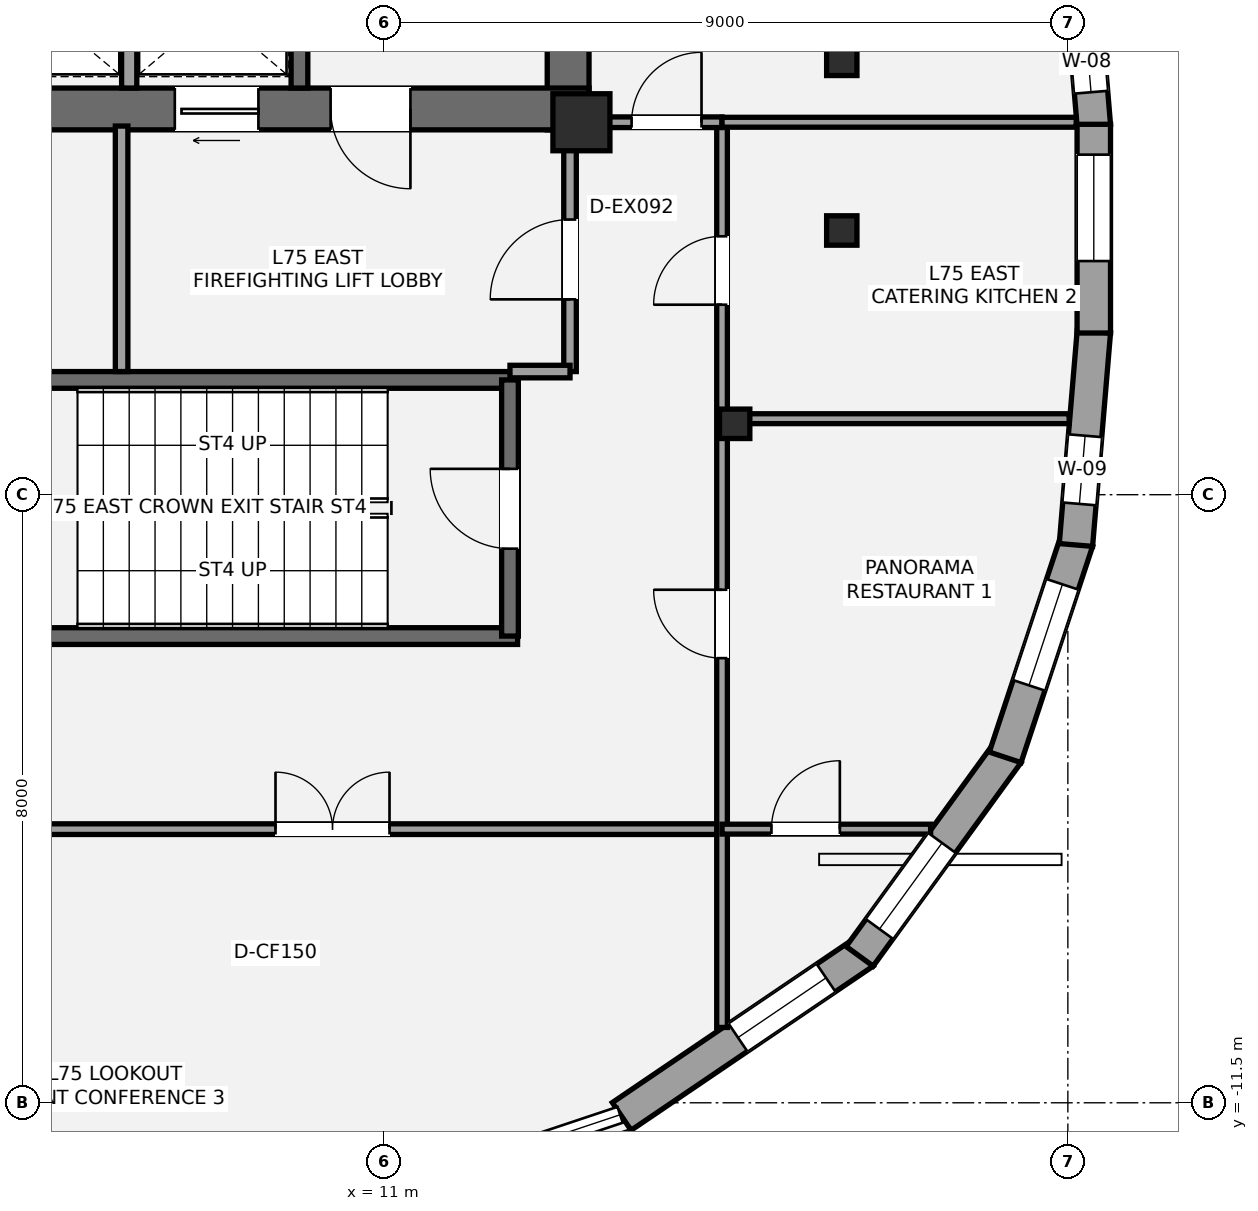
"""IFC4 building model, lengths in metres.
Left out: names, types, materials, properties, quantities, classifications, styles, units other than length and angle.
Written with IfcOpenShell. Run it as: python <this file> out.ifc"""

import sys

from ifc_helpers import new_model, si_unit, direction, frame, frame_2d, origin, origin_2d, place, context, subcontext, project, spatial, rectangle, i_section, extrude, element, fill, save


model = new_model("IFC4")
c1 = context("Model", 3, precision=1e-05, world=origin(), true_north=direction((0.0, 1.0)))
c2 = subcontext(c1, "Body", "Model", "MODEL_VIEW")
j1 = project(units=[si_unit("LENGTHUNIT", "METRE"), si_unit("PLANEANGLEUNIT", "RADIAN")], contexts=[c1])
p1 = place(None, origin())
s1 = spatial("IfcSite", under=j1, at=p1, CompositionType="ELEMENT")
p2 = place(p1, origin())
s2 = spatial("IfcBuilding", under=s1, at=p2, CompositionType="ELEMENT")
p3 = place(p2, frame((0.0, 0.0, 264.8)))
s3 = spatial("IfcBuildingStorey", under=s2, at=p3, CompositionType="ELEMENT", Elevation=264.8)
p4 = place(p3, frame((13.425, 1.3, 0.0), z_axis=(0.0, 0.0, 1.0), x_axis=(0.0, 1.0, 0.0)))
e1 = element("IfcWall", 1, at=p4, inside=s3, PredefinedType="SHEAR", context=c2, shape_type="SweptSolid", body=[
    extrude(rectangle(XDim=8.25, YDim=0.55, at=frame_2d((4.125, 0.0))), origin(), (0.0, 0.0, 1.0), 4.4),
])
p5 = place(p3, frame((13.7, 1.575, 0.0), z_axis=(0.0, 0.0, 1.0), x_axis=(-1.0, 0.0, 0.0)))
e2 = element("IfcWall", 2, at=p5, inside=s3, PredefinedType="SHEAR", context=c2, shape_type="SweptSolid", body=[
    extrude(rectangle(XDim=8.775, YDim=0.55, at=frame_2d((4.387, 0.0))), origin(), (0.0, 0.0, 1.0), 4.4),
])
p6 = place(p5, frame((2.35, 0.0, 0.0)))
e3 = element("IfcOpeningElement", 3, at=p6, cuts=e2, PredefinedType="OPENING", context=c2, shape_type="SweptSolid", body=[
    extrude(rectangle(XDim=1.05, YDim=2.15, at=frame_2d((0.525, 1.075))), frame((0.0, 0.285, 0.0), z_axis=(0.0, -1.0, 0.0), x_axis=(1.0, 0.0, 0.0)), (0.0, 0.0, 1.0), 0.57),
])
p7 = place(p5, frame((4.35, 0.0, 0.0)))
e4 = element("IfcOpeningElement", 4, at=p7, cuts=e2, PredefinedType="OPENING", context=c2, shape_type="SweptSolid", body=[
    extrude(rectangle(XDim=1.1, YDim=2.2, at=frame_2d((0.55, 1.1))), frame((0.0, 0.285, 0.0), z_axis=(0.0, -1.0, 0.0), x_axis=(1.0, 0.0, 0.0)), (0.0, 0.0, 1.0), 0.57),
])
p8 = place(p3, frame((9.89, 1.85, 0.0), z_axis=(0.0, 0.0, 1.0), x_axis=(0.0, 1.0, 0.0)))
e5 = element("IfcWall", 5, at=p8, inside=s3, PredefinedType="SHEAR", context=c2, shape_type="SweptSolid", body=[
    extrude(rectangle(XDim=7.15, YDim=0.22, at=frame_2d((3.575, 0.0))), origin(), (0.0, 0.0, 1.0), 4.4),
])
for number, where, z_axis, x_axis in (
    (6, (5.26, -1.99, 0.0), (0.0, 0.0, 1.0), (1.0, 0.0, 0.0)),
    (7, (5.26, -5.36, 0.0), (0.0, 0.0, 1.0), (1.0, 0.0, 0.0)),
):
    element("IfcWall", number, at=place(p3, frame(where, z_axis=z_axis, x_axis=x_axis)), inside=s3, PredefinedType="SHEAR", context=c2, shape_type="SweptSolid", body=[
        extrude(rectangle(XDim=7.5, YDim=0.22, at=frame_2d((3.75, 0.0))), origin(), (0.0, 0.0, 1.0), 4.4),
    ])
p9 = place(p3, frame((12.66, -5.36, 0.0), z_axis=(0.0, 0.0, 1.0), x_axis=(0.0, 1.0, 0.0)))
e8 = element("IfcWall", 8, at=p9, inside=s3, PredefinedType="SHEAR", context=c2, shape_type="SweptSolid", body=[
    extrude(rectangle(XDim=3.37, YDim=0.22, at=frame_2d((1.685, 0.0))), origin(), (0.0, 0.0, 1.0), 4.4),
])
p10 = place(p9, frame((1.15, 0.0, 0.0)))
e9 = element("IfcOpeningElement", 9, at=p10, cuts=e8, PredefinedType="OPENING", context=c2, shape_type="SweptSolid", body=[
    extrude(rectangle(XDim=1.05, YDim=2.15, at=frame_2d((0.525, 1.075))), frame((0.0, 0.12, 0.0), z_axis=(0.0, -1.0, 0.0), x_axis=(1.0, 0.0, 0.0)), (0.0, 0.0, 1.0), 0.24),
])
p11 = place(p3, frame((13.6, 1.4, 0.0), z_axis=(0.0, 0.0, 1.0), x_axis=(1.0, 0.0, 0.0)))
e10 = element("IfcColumn", 10, at=p11, inside=s3, PredefinedType="PILASTER", context=c2, shape_type="SweptSolid", body=[
    extrude(rectangle(XDim=0.75, YDim=0.75, at=origin_2d()), origin(), (0.0, 0.0, 1.0), 4.4),
])
for number, where, z_axis, x_axis in (
    (11, (17.026, 2.208, 0.0), (0.0, 0.0, 1.0), (1.0, 0.0, 0.0)),
    (12, (15.616, -2.567, 0.0), (0.0, 0.0, 1.0), (1.0, 0.0, 0.0)),
    (13, (17.026, -0.024, 0.0), (0.0, 0.0, 1.0), (1.0, 0.0, 0.0)),
):
    element("IfcColumn", number, at=place(p3, frame(where, z_axis=z_axis, x_axis=x_axis)), inside=s3, PredefinedType="COLUMN", context=c2, shape_type="SweptSolid", body=[
        extrude(i_section(OverallWidth=0.399, OverallDepth=0.387, WebThickness=0.021, FlangeThickness=0.033, at=origin_2d()), origin(), (0.0, 0.0, 1.0), 4.4),
    ])
p12 = place(p3, frame((20.106, 4.162, 0.0), z_axis=(0.0, 0.0, 1.0), x_axis=(0.083719665048, -0.996489346498, 0.0)))
e14 = element("IfcWall", 14, at=p12, inside=s3, PredefinedType="STANDARD", context=c2, shape_type="SweptSolid", body=[
    extrude(rectangle(XDim=2.817, YDim=0.44, at=frame_2d((1.409, 0.0))), origin(), (0.0, 0.0, 1.0), 3.566),
])
p13 = place(p12, frame((0.975, 0.0, 0.6)))
e15 = element("IfcOpeningElement", 15, at=p13, cuts=e14, PredefinedType="OPENING", context=c2, shape_type="SweptSolid", body=[
    extrude(rectangle(XDim=1.4, YDim=1.55, at=frame_2d((0.7, 0.775))), frame((0.0, 0.23, 0.0), z_axis=(0.0, -1.0, 0.0), x_axis=(1.0, 0.0, 0.0)), (0.0, 0.0, 1.0), 0.46),
])
p14 = place(p3, frame((17.315, -9.52, 0.0), z_axis=(0.0, 0.0, 1.0), x_axis=(-0.827730474906, -0.561125886867, 0.0)))
e16 = element("IfcWall", 16, at=p14, inside=s3, PredefinedType="STANDARD", context=c2, shape_type="SweptSolid", body=[
    extrude(rectangle(XDim=3.848, YDim=0.44, at=frame_2d((1.924, 0.0))), origin(), (0.0, 0.0, 1.0), 3.566),
])
p15 = place(p14, frame((0.6, 0.0, 0.58)))
e17 = element("IfcOpeningElement", 17, at=p15, cuts=e16, PredefinedType="OPENING", context=c2, shape_type="SweptSolid", body=[
    extrude(rectangle(XDim=1.4, YDim=1.55, at=frame_2d((0.7, 0.775))), frame((0.0, 0.23, 0.0), z_axis=(0.0, -1.0, 0.0), x_axis=(1.0, 0.0, 0.0)), (0.0, 0.0, 1.0), 0.46),
])
p16 = place(p3, frame((19.207, -6.895, 0.0), z_axis=(0.0, 0.0, 1.0), x_axis=(-0.5878953838, -0.808936967697, 0.0)))
e18 = element("IfcWall", 18, at=p16, inside=s3, PredefinedType="STANDARD", context=c2, shape_type="SweptSolid", body=[
    extrude(rectangle(XDim=3.31, YDim=0.44, at=frame_2d((1.655, 0.0))), origin(), (0.0, 0.0, 1.0), 3.566),
])
p17 = place(p16, frame((1.467, 0.0, 0.58)))
e19 = element("IfcOpeningElement", 19, at=p17, cuts=e18, PredefinedType="OPENING", context=c2, shape_type="SweptSolid", body=[
    extrude(rectangle(XDim=1.4, YDim=1.55, at=frame_2d((0.7, 0.775))), frame((0.0, 0.23, 0.0), z_axis=(0.0, -1.0, 0.0), x_axis=(1.0, 0.0, 0.0)), (0.0, 0.0, 1.0), 0.46),
])
p18 = place(p3, frame((20.117, -4.111, 0.0), z_axis=(0.0, 0.0, 1.0), x_axis=(-0.314148979119, -0.949373698245, 0.0)))
e20 = element("IfcWall", 20, at=p18, inside=s3, PredefinedType="STANDARD", context=c2, shape_type="SweptSolid", body=[
    extrude(rectangle(XDim=2.996, YDim=0.44, at=frame_2d((1.498, 0.0))), origin(), (0.0, 0.0, 1.0), 3.566),
])
p19 = place(p18, frame((0.599, 0.0, 0.58)))
e21 = element("IfcOpeningElement", 21, at=p19, cuts=e20, PredefinedType="OPENING", context=c2, shape_type="SweptSolid", body=[
    extrude(rectangle(XDim=1.4, YDim=1.55, at=frame_2d((0.7, 0.775))), frame((0.0, 0.23, 0.0), z_axis=(0.0, -1.0, 0.0), x_axis=(1.0, 0.0, 0.0)), (0.0, 0.0, 1.0), 0.46),
])
p20 = place(p3, frame((20.342, -1.354, 0.0), z_axis=(0.0, 0.0, 1.0), x_axis=(-0.083719665048, -0.996489346498, 0.0)))
e22 = element("IfcWall", 22, at=p20, inside=s3, PredefinedType="STANDARD", context=c2, shape_type="SweptSolid", body=[
    extrude(rectangle(XDim=2.817, YDim=0.44, at=frame_2d((1.409, 0.0))), origin(), (0.0, 0.0, 1.0), 3.566),
])
p21 = place(p20, frame((1.375, 0.0, 0.58)))
e23 = element("IfcOpeningElement", 23, at=p21, cuts=e22, PredefinedType="OPENING", context=c2, shape_type="SweptSolid", body=[
    extrude(rectangle(XDim=0.9, YDim=1.35, at=frame_2d((0.45, 0.675))), frame((0.0, 0.23, 0.0), z_axis=(0.0, -1.0, 0.0), x_axis=(1.0, 0.0, 0.0)), (0.0, 0.0, 1.0), 0.46),
])
p22 = place(p3, frame((20.341, 1.373, 0.0), z_axis=(0.0, 0.0, 1.0), x_axis=(0.0, -1.0, 0.0)))
e24 = element("IfcWall", 24, at=p22, inside=s3, PredefinedType="STANDARD", context=c2, shape_type="SweptSolid", body=[
    extrude(rectangle(XDim=2.746, YDim=0.44, at=frame_2d((1.373, 0.0))), origin(), (0.0, 0.0, 1.0), 3.566),
])
p23 = place(p22, frame((0.399, 0.0, 0.58)))
e25 = element("IfcOpeningElement", 25, at=p23, cuts=e24, PredefinedType="OPENING", context=c2, shape_type="SweptSolid", body=[
    extrude(rectangle(XDim=1.4, YDim=1.55, at=frame_2d((0.7, 0.775))), frame((0.0, 0.23, 0.0), z_axis=(0.0, -1.0, 0.0), x_axis=(1.0, 0.0, 0.0)), (0.0, 0.0, 1.0), 0.46),
])
p24 = place(p3, frame((7.55, -1.88, 0.0), z_axis=(0.0, 0.0, 1.0), x_axis=(0.0, 1.0, 0.0)))
e26 = element("IfcWall", 26, at=p24, inside=s3, PredefinedType="PARTITIONING", context=c2, shape_type="SweptSolid", body=[
    extrude(rectangle(XDim=3.23, YDim=0.165, at=frame_2d((1.615, 0.0))), origin(), (0.0, 0.0, 1.0), 4.2),
])
p25 = place(p3, frame((13.45, -1.88, 0.0), z_axis=(0.0, 0.0, 1.0), x_axis=(0.0, 1.0, 0.0)))
e27 = element("IfcWall", 27, at=p25, inside=s3, PredefinedType="PARTITIONING", context=c2, shape_type="SweptSolid", body=[
    extrude(rectangle(XDim=3.23, YDim=0.165, at=frame_2d((1.615, 0.0))), origin(), (0.0, 0.0, 1.0), 3.661),
])
p26 = place(p25, frame((0.95, 0.0, 0.0)))
e28 = element("IfcOpeningElement", 28, at=p26, cuts=e27, PredefinedType="OPENING", context=c2, shape_type="SweptSolid", body=[
    extrude(rectangle(XDim=1.05, YDim=2.15, at=frame_2d((0.525, 1.075))), frame((0.0, 0.093, 0.0), z_axis=(0.0, -1.0, 0.0), x_axis=(1.0, 0.0, 0.0)), (0.0, 0.0, 1.0), 0.185),
])
p27 = place(p3, frame((12.66, -1.88, 0.0), z_axis=(0.0, 0.0, 1.0), x_axis=(1.0, 0.0, 0.0)))
e29 = element("IfcWall", 29, at=p27, inside=s3, PredefinedType="PARTITIONING", context=c2, shape_type="SweptSolid", body=[
    extrude(rectangle(XDim=0.79, YDim=0.165, at=frame_2d((0.395, 0.0))), origin(), (0.0, 0.0, 1.0), 3.661),
])
p28 = place(p3, frame((7.65, 1.85, 0.0), z_axis=(0.0, 0.0, 1.0), x_axis=(0.0, 1.0, 0.0)))
e30 = element("IfcWall", 30, at=p28, inside=s3, PredefinedType="SOLIDWALL", context=c2, shape_type="SweptSolid", body=[
    extrude(rectangle(XDim=1.97, YDim=0.2, at=frame_2d((0.985, 0.0))), origin(), (0.0, 0.0, 1.0), 4.2),
])
p29 = place(p3, frame((-15.45, -7.9, 0.0), z_axis=(0.0, 0.0, 1.0), x_axis=(1.0, 0.0, 0.0)))
e31 = element("IfcWall", 31, at=p29, inside=s3, PredefinedType="PARTITIONING", context=c2, shape_type="SweptSolid", body=[
    extrude(rectangle(XDim=30.9, YDim=0.14, at=frame_2d((15.45, 0.0))), origin(), (0.0, 0.0, 1.0), 3.661),
])
p30 = place(p29, frame((5.275, 0.0, 0.0)))
e32 = element("IfcOpeningElement", 32, at=p30, cuts=e31, PredefinedType="OPENING", context=c2, shape_type="SweptSolid", body=[
    extrude(rectangle(XDim=0.9, YDim=2.1, at=frame_2d((0.45, 1.05))), frame((0.0, 0.08, 0.0), z_axis=(0.0, -1.0, 0.0), x_axis=(1.0, 0.0, 0.0)), (0.0, 0.0, 1.0), 0.16),
])
p31 = place(p29, frame((15.6, 0.0, 0.0)))
e33 = element("IfcOpeningElement", 33, at=p31, cuts=e31, PredefinedType="OPENING", context=c2, shape_type="SweptSolid", body=[
    extrude(rectangle(XDim=0.9, YDim=2.1, at=frame_2d((0.45, 1.05))), frame((0.0, 0.08, 0.0), z_axis=(0.0, -1.0, 0.0), x_axis=(1.0, 0.0, 0.0)), (0.0, 0.0, 1.0), 0.16),
])
p32 = place(p29, frame((25.025, 0.0, 0.0)))
e34 = element("IfcOpeningElement", 34, at=p32, cuts=e31, PredefinedType="OPENING", context=c2, shape_type="SweptSolid", body=[
    extrude(rectangle(XDim=1.5, YDim=2.15, at=frame_2d((0.75, 1.075))), frame((0.0, 0.08, 0.0), z_axis=(0.0, -1.0, 0.0), x_axis=(1.0, 0.0, 0.0)), (0.0, 0.0, 1.0), 0.16),
])
p33 = place(p3, frame((15.45, -10.509, 0.0), z_axis=(0.0, 0.0, 1.0), x_axis=(0.0, 1.0, 0.0)))
e35 = element("IfcWall", 35, at=p33, inside=s3, PredefinedType="PARTITIONING", context=c2, shape_type="SweptSolid", body=[
    extrude(rectangle(XDim=11.909, YDim=0.14, at=frame_2d((5.955, 0.0))), origin(), (0.0, 0.0, 1.0), 3.661),
])
p34 = place(p33, frame((4.859, 0.0, 0.0)))
e36 = element("IfcOpeningElement", 36, at=p34, cuts=e35, PredefinedType="OPENING", context=c2, shape_type="SweptSolid", body=[
    extrude(rectangle(XDim=0.9, YDim=2.1, at=frame_2d((0.45, 1.05))), frame((0.0, 0.08, 0.0), z_axis=(0.0, -1.0, 0.0), x_axis=(1.0, 0.0, 0.0)), (0.0, 0.0, 1.0), 0.16),
])
p35 = place(p33, frame((9.509, 0.0, 0.0)))
e37 = element("IfcOpeningElement", 37, at=p35, cuts=e35, PredefinedType="OPENING", context=c2, shape_type="SweptSolid", body=[
    extrude(rectangle(XDim=0.9, YDim=2.1, at=frame_2d((0.45, 1.05))), frame((0.0, 0.08, 0.0), z_axis=(0.0, -1.0, 0.0), x_axis=(1.0, 0.0, 0.0)), (0.0, 0.0, 1.0), 0.16),
])
p36 = place(p3, frame((13.7, 1.4, 0.0), z_axis=(0.0, 0.0, 1.0), x_axis=(1.0, 0.0, 0.0)))
e38 = element("IfcWall", 38, at=p36, inside=s3, PredefinedType="PARTITIONING", context=c2, shape_type="SweptSolid", body=[
    extrude(rectangle(XDim=1.75, YDim=0.14, at=frame_2d((0.875, 0.0))), origin(), (0.0, 0.0, 1.0), 3.661),
])
p37 = place(p36, frame((0.56, 0.0, 0.0)))
e39 = element("IfcOpeningElement", 39, at=p37, cuts=e38, PredefinedType="OPENING", context=c2, shape_type="SweptSolid", body=[
    extrude(rectangle(XDim=0.92, YDim=2.15, at=frame_2d((0.46, 1.075))), frame((0.0, 0.08, 0.0), z_axis=(0.0, -1.0, 0.0), x_axis=(1.0, 0.0, 0.0)), (0.0, 0.0, 1.0), 0.16),
])
p38 = place(p3, frame((15.45, 1.4, 0.0), z_axis=(0.0, 0.0, 1.0), x_axis=(1.0, 0.0, 0.0)))
e40 = element("IfcWall", 40, at=p38, inside=s3, PredefinedType="PARTITIONING", context=c2, shape_type="SweptSolid", body=[
    extrude(rectangle(XDim=4.659, YDim=0.13, at=frame_2d((2.33, 0.0))), origin(), (0.0, 0.0, 1.0), 3.661),
])
p39 = place(p3, frame((15.45, -7.9, 0.0), z_axis=(0.0, 0.0, 1.0), x_axis=(1.0, 0.0, 0.0)))
e41 = element("IfcWall", 41, at=p39, inside=s3, PredefinedType="PARTITIONING", context=c2, shape_type="SweptSolid", body=[
    extrude(rectangle(XDim=2.744, YDim=0.13, at=frame_2d((1.372, 0.0))), origin(), (0.0, 0.0, 1.0), 3.661),
])
p40 = place(p39, frame((0.65, 0.0, 0.0)))
e42 = element("IfcOpeningElement", 42, at=p40, cuts=e41, PredefinedType="OPENING", context=c2, shape_type="SweptSolid", body=[
    extrude(rectangle(XDim=0.9, YDim=2.1, at=frame_2d((0.45, 1.05))), frame((0.0, 0.075, 0.0), z_axis=(0.0, -1.0, 0.0), x_axis=(1.0, 0.0, 0.0)), (0.0, 0.0, 1.0), 0.15),
])
p41 = place(p3, frame((15.45, -2.5, 0.0), z_axis=(0.0, 0.0, 1.0), x_axis=(1.0, 0.0, 0.0)))
e43 = element("IfcWall", 43, at=p41, inside=s3, PredefinedType="PARTITIONING", context=c2, shape_type="SweptSolid", body=[
    extrude(rectangle(XDim=4.567, YDim=0.13, at=frame_2d((2.284, 0.0))), origin(), (0.0, 0.0, 1.0), 4.2),
])
p42 = place(p13, origin())
e44 = element("IfcWindow", 44, at=p42, inside=s3, PartitioningType="SINGLE_PANEL", PredefinedType="WINDOW", context=c2, shape_type="SweptSolid", body=[
    extrude(rectangle(XDim=1.4, YDim=1.55, at=frame_2d((0.7, 0.775))), frame((0.0, -0.01, 0.0), z_axis=(0.0, -1.0, 0.0), x_axis=(1.0, 0.0, 0.0)), (0.0, 0.0, 1.0), 0.06),
])
fill(e15, e44)
p43 = place(p15, origin())
e45 = element("IfcWindow", 45, at=p43, inside=s3, PartitioningType="SINGLE_PANEL", PredefinedType="WINDOW", context=c2, shape_type="SweptSolid", body=[
    extrude(rectangle(XDim=1.4, YDim=1.55, at=frame_2d((0.7, 0.775))), frame((0.0, -0.01, 0.0), z_axis=(0.0, -1.0, 0.0), x_axis=(1.0, 0.0, 0.0)), (0.0, 0.0, 1.0), 0.06),
])
fill(e17, e45)
p44 = place(p17, origin())
e46 = element("IfcWindow", 46, at=p44, inside=s3, PartitioningType="SINGLE_PANEL", PredefinedType="WINDOW", context=c2, shape_type="SweptSolid", body=[
    extrude(rectangle(XDim=1.4, YDim=1.55, at=frame_2d((0.7, 0.775))), frame((0.0, -0.01, 0.0), z_axis=(0.0, -1.0, 0.0), x_axis=(1.0, 0.0, 0.0)), (0.0, 0.0, 1.0), 0.06),
])
fill(e19, e46)
p45 = place(p19, origin())
e47 = element("IfcWindow", 47, at=p45, inside=s3, PartitioningType="SINGLE_PANEL", PredefinedType="WINDOW", context=c2, shape_type="SweptSolid", body=[
    extrude(rectangle(XDim=1.4, YDim=1.55, at=frame_2d((0.7, 0.775))), frame((0.0, -0.01, 0.0), z_axis=(0.0, -1.0, 0.0), x_axis=(1.0, 0.0, 0.0)), (0.0, 0.0, 1.0), 0.06),
])
fill(e21, e47)
p46 = place(p21, origin())
e48 = element("IfcWindow", 48, at=p46, inside=s3, PartitioningType="SINGLE_PANEL", PredefinedType="WINDOW", context=c2, shape_type="SweptSolid", body=[
    extrude(rectangle(XDim=0.9, YDim=1.35, at=frame_2d((0.45, 0.675))), frame((0.0, -0.01, 0.0), z_axis=(0.0, -1.0, 0.0), x_axis=(1.0, 0.0, 0.0)), (0.0, 0.0, 1.0), 0.06),
])
fill(e23, e48)
p47 = place(p23, origin())
e49 = element("IfcWindow", 49, at=p47, inside=s3, PartitioningType="SINGLE_PANEL", PredefinedType="WINDOW", context=c2, shape_type="SweptSolid", body=[
    extrude(rectangle(XDim=1.4, YDim=1.55, at=frame_2d((0.7, 0.775))), frame((0.0, -0.01, 0.0), z_axis=(0.0, -1.0, 0.0), x_axis=(1.0, 0.0, 0.0)), (0.0, 0.0, 1.0), 0.06),
])
fill(e25, e49)
p48 = place(p6, origin())
e50 = element("IfcDoor", 50, at=p48, inside=s3, OperationType="SINGLE_SWING_LEFT", PredefinedType="DOOR", context=c2, shape_type="SweptSolid", body=[
    extrude(rectangle(XDim=1.05, YDim=2.15, at=frame_2d((0.525, 1.075))), frame((0.0, 0.025, 0.0), z_axis=(0.0, -1.0, 0.0), x_axis=(1.0, 0.0, 0.0)), (0.0, 0.0, 1.0), 0.05),
])
fill(e3, e50)
p49 = place(p10, origin())
e51 = element("IfcDoor", 51, at=p49, inside=s3, OperationType="SINGLE_SWING_RIGHT", PredefinedType="DOOR", context=c2, shape_type="SweptSolid", body=[
    extrude(rectangle(XDim=1.05, YDim=2.15, at=frame_2d((0.525, 1.075))), frame((0.0, 0.025, 0.0), z_axis=(0.0, -1.0, 0.0), x_axis=(1.0, 0.0, 0.0)), (0.0, 0.0, 1.0), 0.05),
])
fill(e9, e51)
p50 = place(p26, origin())
e52 = element("IfcDoor", 52, at=p50, inside=s3, OperationType="SINGLE_SWING_LEFT", PredefinedType="DOOR", context=c2, shape_type="SweptSolid", body=[
    extrude(rectangle(XDim=1.05, YDim=2.15, at=frame_2d((0.525, 1.075))), frame((0.0, 0.025, 0.0), z_axis=(0.0, -1.0, 0.0), x_axis=(1.0, 0.0, 0.0)), (0.0, 0.0, 1.0), 0.05),
])
fill(e28, e52)
p51 = place(p7, origin())
e53 = element("IfcDoor", 53, at=p51, inside=s3, OperationType="SLIDING_TO_LEFT", PredefinedType="DOOR", context=c2, shape_type="SweptSolid", body=[
    extrude(rectangle(XDim=1.1, YDim=2.2, at=frame_2d((0.55, 1.1))), frame((0.0, 0.025, 0.0), z_axis=(0.0, -1.0, 0.0), x_axis=(1.0, 0.0, 0.0)), (0.0, 0.0, 1.0), 0.05),
])
fill(e4, e53)
p52 = place(p32, origin())
e54 = element("IfcDoor", 54, at=p52, inside=s3, OperationType="DOUBLE_DOOR_SINGLE_SWING", PredefinedType="DOOR", context=c2, shape_type="SweptSolid", body=[
    extrude(rectangle(XDim=1.5, YDim=2.15, at=frame_2d((0.75, 1.075))), frame((0.0, 0.025, 0.0), z_axis=(0.0, -1.0, 0.0), x_axis=(1.0, 0.0, 0.0)), (0.0, 0.0, 1.0), 0.05),
])
fill(e34, e54)
p53 = place(p37, origin())
e55 = element("IfcDoor", 55, at=p53, inside=s3, OperationType="SINGLE_SWING_RIGHT", PredefinedType="DOOR", context=c2, shape_type="SweptSolid", body=[
    extrude(rectangle(XDim=0.92, YDim=2.15, at=frame_2d((0.46, 1.075))), frame((0.0, 0.025, 0.0), z_axis=(0.0, -1.0, 0.0), x_axis=(1.0, 0.0, 0.0)), (0.0, 0.0, 1.0), 0.05),
])
fill(e39, e55)
p54 = place(p40, origin())
e56 = element("IfcDoor", 56, at=p54, inside=s3, OperationType="SINGLE_SWING_RIGHT", PredefinedType="DOOR", context=c2, shape_type="SweptSolid", body=[
    extrude(rectangle(XDim=0.9, YDim=2.1, at=frame_2d((0.45, 1.05))), frame((0.0, 0.025, 0.0), z_axis=(0.0, -1.0, 0.0), x_axis=(1.0, 0.0, 0.0)), (0.0, 0.0, 1.0), 0.05),
])
fill(e42, e56)
p55 = place(p34, origin())
e57 = element("IfcDoor", 57, at=p55, inside=s3, OperationType="SINGLE_SWING_RIGHT", PredefinedType="DOOR", context=c2, shape_type="SweptSolid", body=[
    extrude(rectangle(XDim=0.9, YDim=2.1, at=frame_2d((0.45, 1.05))), frame((0.0, 0.025, 0.0), z_axis=(0.0, -1.0, 0.0), x_axis=(1.0, 0.0, 0.0)), (0.0, 0.0, 1.0), 0.05),
])
fill(e36, e57)
p56 = place(p35, origin())
e58 = element("IfcDoor", 58, at=p56, inside=s3, OperationType="SINGLE_SWING_LEFT", PredefinedType="DOOR", context=c2, shape_type="SweptSolid", body=[
    extrude(rectangle(XDim=0.9, YDim=2.1, at=frame_2d((0.45, 1.05))), frame((0.0, 0.025, 0.0), z_axis=(0.0, -1.0, 0.0), x_axis=(1.0, 0.0, 0.0)), (0.0, 0.0, 1.0), 0.05),
])
fill(e37, e58)
save(model, sys.argv[1])
